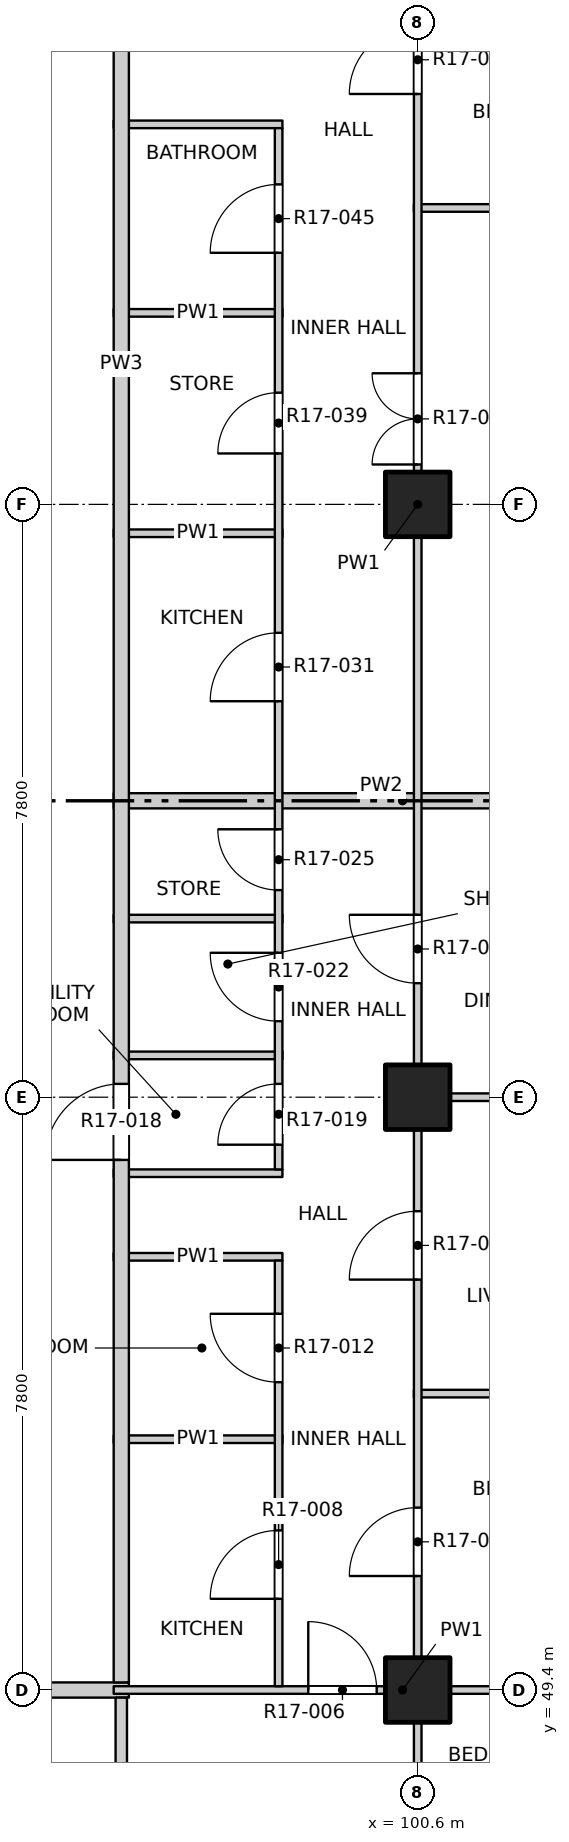
"""IFC4 building model, lengths in metres.
Left out: names, types, materials, properties, quantities, classifications, styles, units other than length and angle.
Written with IfcOpenShell. Run it as: python <this file> out.ifc"""

import sys

from ifc_helpers import new_model, si_unit, direction, frame, frame_2d, origin, origin_2d, place, context, subcontext, project, spatial, rectangle, extrude, element, fill, save


model = new_model("IFC4")
c1 = context("Model", 3, precision=1e-05, world=origin(), true_north=direction((0.0, 1.0)))
c2 = subcontext(c1, "Body", "Model", "MODEL_VIEW")
j1 = project(units=[si_unit("LENGTHUNIT", "METRE"), si_unit("PLANEANGLEUNIT", "RADIAN")], contexts=[c1])
p1 = place(None, origin())
s1 = spatial("IfcSite", under=j1, at=p1, CompositionType="ELEMENT")
p2 = place(p1, origin())
s2 = spatial("IfcBuilding", under=s1, at=p2, CompositionType="ELEMENT")
p3 = place(p2, frame((0.0, 0.0, 179.2)))
s3 = spatial("IfcBuildingStorey", under=s2, at=p3, CompositionType="ELEMENT", Elevation=179.2)
for number, where, z_axis, x_axis in (
    (1, (100.6, 49.4, -0.3), (0.0, 0.0, 1.0), (1.0, 0.0, 0.0)),
    (2, (100.6, 57.2, -0.3), (0.0, 0.0, 1.0), (1.0, 0.0, 0.0)),
    (3, (100.6, 65.0, -0.3), (0.0, 0.0, 1.0), (1.0, 0.0, 0.0)),
):
    element("IfcColumn", number, at=place(p3, frame(where, z_axis=z_axis, x_axis=x_axis)), inside=s3, PredefinedType="COLUMN", context=c2, shape_type="SweptSolid", body=[
        extrude(rectangle(XDim=0.85, YDim=0.85, at=origin_2d()), origin(), (0.0, 0.0, 1.0), 3.45),
    ])
p4 = place(p3, frame((73.2, 49.4, 0.0), z_axis=(0.0, 0.0, 1.0), x_axis=(1.0, 0.0, 0.0)))
e4 = element("IfcWall", 4, at=p4, inside=s3, PredefinedType="PARTITIONING", context=c2, shape_type="SweptSolid", body=[
    extrude(rectangle(XDim=23.6, YDim=0.2, at=frame_2d((11.8, 0.0))), origin(), (0.0, 0.0, 1.0), 3.15),
])
p5 = place(p4, frame((7.3, 0.0, 0.0)))
e5 = element("IfcOpeningElement", 5, at=p5, cuts=e4, PredefinedType="OPENING", context=c2, shape_type="SweptSolid", body=[
    extrude(rectangle(XDim=1.2, YDim=2.1, at=frame_2d((0.6, 1.05))), frame((0.0, 0.11, 0.0), z_axis=(0.0, -1.0, 0.0), x_axis=(1.0, 0.0, 0.0)), (0.0, 0.0, 1.0), 0.22),
])
p6 = place(p4, frame((20.125, 0.0, 0.0)))
e6 = element("IfcOpeningElement", 6, at=p6, cuts=e4, PredefinedType="OPENING", context=c2, shape_type="SweptSolid", body=[
    extrude(rectangle(XDim=1.2, YDim=2.1, at=frame_2d((0.6, 1.05))), frame((0.0, 0.11, 0.0), z_axis=(0.0, -1.0, 0.0), x_axis=(1.0, 0.0, 0.0)), (0.0, 0.0, 1.0), 0.22),
])
p7 = place(p3, frame((96.6, 49.4, 0.0), z_axis=(0.0, 0.0, 1.0), x_axis=(1.0, 0.0, 0.0)))
e7 = element("IfcWall", 7, at=p7, inside=s3, PredefinedType="PARTITIONING", context=c2, shape_type="SweptSolid", body=[
    extrude(rectangle(XDim=7.6, YDim=0.1, at=frame_2d((3.8, 0.0))), origin(), (0.0, 0.0, 1.0), 3.15),
])
p8 = place(p7, frame((2.56, 0.0, 0.0)))
e8 = element("IfcOpeningElement", 8, at=p8, cuts=e7, PredefinedType="OPENING", context=c2, shape_type="SweptSolid", body=[
    extrude(rectangle(XDim=0.9, YDim=2.1, at=frame_2d((0.45, 1.05))), frame((0.0, 0.06, 0.0), z_axis=(0.0, -1.0, 0.0), x_axis=(1.0, 0.0, 0.0)), (0.0, 0.0, 1.0), 0.12),
])
p9 = place(p3, frame((96.6, 52.7, 0.0), z_axis=(0.0, 0.0, 1.0), x_axis=(1.0, 0.0, 0.0)))
e9 = element("IfcWall", 9, at=p9, inside=s3, PredefinedType="PARTITIONING", context=c2, shape_type="SweptSolid", body=[
    extrude(rectangle(XDim=2.22, YDim=0.1, at=frame_2d((1.11, 0.0))), origin(), (0.0, 0.0, 1.0), 3.15),
])
p10 = place(p3, frame((100.55, 53.3, 0.0), z_axis=(0.0, 0.0, 1.0), x_axis=(1.0, 0.0, 0.0)))
e10 = element("IfcWall", 10, at=p10, inside=s3, PredefinedType="PARTITIONING", context=c2, shape_type="SweptSolid", body=[
    extrude(rectangle(XDim=3.65, YDim=0.1, at=frame_2d((1.825, 0.0))), origin(), (0.0, 0.0, 1.0), 3.15),
])
for number, where, z_axis, x_axis in (
    (11, (96.6, 55.1, 0.0), (0.0, 0.0, 1.0), (1.0, 0.0, 0.0)),
    (12, (96.6, 56.2, 0.0), (0.0, 0.0, 1.0), (1.0, 0.0, 0.0)),
):
    element("IfcWall", number, at=place(p3, frame(where, z_axis=z_axis, x_axis=x_axis)), inside=s3, PredefinedType="PARTITIONING", context=c2, shape_type="SweptSolid", body=[
        extrude(rectangle(XDim=2.22, YDim=0.1, at=frame_2d((1.11, 0.0))), origin(), (0.0, 0.0, 1.0), 3.15),
    ])
p11 = place(p3, frame((100.55, 57.2, 0.0), z_axis=(0.0, 0.0, 1.0), x_axis=(1.0, 0.0, 0.0)))
e13 = element("IfcWall", 13, at=p11, inside=s3, PredefinedType="PARTITIONING", context=c2, shape_type="SweptSolid", body=[
    extrude(rectangle(XDim=3.65, YDim=0.1, at=frame_2d((1.825, 0.0))), origin(), (0.0, 0.0, 1.0), 3.15),
])
for number, where, z_axis, x_axis in (
    (14, (96.6, 57.75, 0.0), (0.0, 0.0, 1.0), (1.0, 0.0, 0.0)),
    (15, (96.6, 59.55, 0.0), (0.0, 0.0, 1.0), (1.0, 0.0, 0.0)),
):
    element("IfcWall", number, at=place(p3, frame(where, z_axis=z_axis, x_axis=x_axis)), inside=s3, PredefinedType="PARTITIONING", context=c2, shape_type="SweptSolid", body=[
        extrude(rectangle(XDim=2.22, YDim=0.1, at=frame_2d((1.11, 0.0))), origin(), (0.0, 0.0, 1.0), 3.15),
    ])
p12 = place(p3, frame((96.6, 61.1, 0.0), z_axis=(0.0, 0.0, 1.0), x_axis=(1.0, 0.0, 0.0)))
e16 = element("IfcWall", 16, at=p12, inside=s3, PredefinedType="PARTITIONING", context=c2, shape_type="SweptSolid", body=[
    extrude(rectangle(XDim=7.6, YDim=0.2, at=frame_2d((3.8, 0.0))), origin(), (0.0, 0.0, 1.0), 2.55),
])
for number, where, z_axis, x_axis in (
    (17, (96.6, 64.62, 0.0), (0.0, 0.0, 1.0), (1.0, 0.0, 0.0)),
    (18, (96.6, 67.52, 0.0), (0.0, 0.0, 1.0), (1.0, 0.0, 0.0)),
):
    element("IfcWall", number, at=place(p3, frame(where, z_axis=z_axis, x_axis=x_axis)), inside=s3, PredefinedType="PARTITIONING", context=c2, shape_type="SweptSolid", body=[
        extrude(rectangle(XDim=2.22, YDim=0.1, at=frame_2d((1.11, 0.0))), origin(), (0.0, 0.0, 1.0), 3.15),
    ])
p13 = place(p3, frame((100.55, 68.9, 0.0), z_axis=(0.0, 0.0, 1.0), x_axis=(1.0, 0.0, 0.0)))
e19 = element("IfcWall", 19, at=p13, inside=s3, PredefinedType="PARTITIONING", context=c2, shape_type="SweptSolid", body=[
    extrude(rectangle(XDim=3.65, YDim=0.1, at=frame_2d((1.825, 0.0))), origin(), (0.0, 0.0, 1.0), 2.55),
])
p14 = place(p3, frame((96.6, 70.0, 0.0), z_axis=(0.0, 0.0, 1.0), x_axis=(1.0, 0.0, 0.0)))
e20 = element("IfcWall", 20, at=p14, inside=s3, PredefinedType="PARTITIONING", context=c2, shape_type="SweptSolid", body=[
    extrude(rectangle(XDim=2.22, YDim=0.1, at=frame_2d((1.11, 0.0))), origin(), (0.0, 0.0, 1.0), 3.15),
])
p15 = place(p3, frame((96.7, 45.8, 0.0), z_axis=(0.0, 0.0, 1.0), x_axis=(0.0, 1.0, 0.0)))
e21 = element("IfcWall", 21, at=p15, inside=s3, PredefinedType="PARTITIONING", context=c2, shape_type="SweptSolid", body=[
    extrude(rectangle(XDim=3.5, YDim=0.15, at=frame_2d((1.75, 0.0))), origin(), (0.0, 0.0, 1.0), 3.15),
])
p16 = place(p3, frame((96.7, 49.5, 0.0), z_axis=(0.0, 0.0, 1.0), x_axis=(0.0, 1.0, 0.0)))
e22 = element("IfcWall", 22, at=p16, inside=s3, PredefinedType="PARTITIONING", context=c2, shape_type="SweptSolid", body=[
    extrude(rectangle(XDim=34.7, YDim=0.2, at=frame_2d((17.35, 0.0))), origin(), (0.0, 0.0, 1.0), 3.15),
])
p17 = place(p16, frame((6.875, 0.0, 0.0)))
e23 = element("IfcOpeningElement", 23, at=p17, cuts=e22, PredefinedType="OPENING", context=c2, shape_type="SweptSolid", body=[
    extrude(rectangle(XDim=1.0, YDim=2.1, at=frame_2d((0.5, 1.05))), frame((0.0, 0.11, 0.0), z_axis=(0.0, -1.0, 0.0), x_axis=(1.0, 0.0, 0.0)), (0.0, 0.0, 1.0), 0.22),
])
p18 = place(p16, frame((21.775, 0.0, 0.0)))
e24 = element("IfcOpeningElement", 24, at=p18, cuts=e22, PredefinedType="OPENING", context=c2, shape_type="SweptSolid", body=[
    extrude(rectangle(XDim=1.0, YDim=2.1, at=frame_2d((0.5, 1.05))), frame((0.0, 0.11, 0.0), z_axis=(0.0, -1.0, 0.0), x_axis=(1.0, 0.0, 0.0)), (0.0, 0.0, 1.0), 0.22),
])
p19 = place(p16, frame((27.725, 0.0, 0.0)))
e25 = element("IfcOpeningElement", 25, at=p19, cuts=e22, PredefinedType="OPENING", context=c2, shape_type="SweptSolid", body=[
    extrude(rectangle(XDim=1.0, YDim=2.1, at=frame_2d((0.5, 1.05))), frame((0.0, 0.11, 0.0), z_axis=(0.0, -1.0, 0.0), x_axis=(1.0, 0.0, 0.0)), (0.0, 0.0, 1.0), 0.22),
])
p20 = place(p3, frame((98.77, 49.45, 0.0), z_axis=(0.0, 0.0, 1.0), x_axis=(0.0, 1.0, 0.0)))
e26 = element("IfcWall", 26, at=p20, inside=s3, PredefinedType="PARTITIONING", context=c2, shape_type="SweptSolid", body=[
    extrude(rectangle(XDim=5.6, YDim=0.1, at=frame_2d((2.8, 0.0))), origin(), (0.0, 0.0, 1.0), 3.15),
])
p21 = place(p20, frame((1.15, 0.0, 0.0)))
e27 = element("IfcOpeningElement", 27, at=p21, cuts=e26, PredefinedType="OPENING", context=c2, shape_type="SweptSolid", body=[
    extrude(rectangle(XDim=0.9, YDim=2.1, at=frame_2d((0.45, 1.05))), frame((0.0, 0.06, 0.0), z_axis=(0.0, -1.0, 0.0), x_axis=(1.0, 0.0, 0.0)), (0.0, 0.0, 1.0), 0.12),
])
p22 = place(p20, frame((4.0, 0.0, 0.0)))
e28 = element("IfcOpeningElement", 28, at=p22, cuts=e26, PredefinedType="OPENING", context=c2, shape_type="SweptSolid", body=[
    extrude(rectangle(XDim=0.9, YDim=2.1, at=frame_2d((0.45, 1.05))), frame((0.0, 0.06, 0.0), z_axis=(0.0, -1.0, 0.0), x_axis=(1.0, 0.0, 0.0)), (0.0, 0.0, 1.0), 0.12),
])
p23 = place(p3, frame((98.77, 56.25, 0.0), z_axis=(0.0, 0.0, 1.0), x_axis=(0.0, 1.0, 0.0)))
e29 = element("IfcWall", 29, at=p23, inside=s3, PredefinedType="PARTITIONING", context=c2, shape_type="SweptSolid", body=[
    extrude(rectangle(XDim=13.7, YDim=0.1, at=frame_2d((6.85, 0.0))), origin(), (0.0, 0.0, 1.0), 3.15),
])
p24 = place(p23, frame((0.325, 0.0, 0.0)))
e30 = element("IfcOpeningElement", 30, at=p24, cuts=e29, PredefinedType="OPENING", context=c2, shape_type="SweptSolid", body=[
    extrude(rectangle(XDim=0.8, YDim=2.1, at=frame_2d((0.4, 1.05))), frame((0.0, 0.06, 0.0), z_axis=(0.0, -1.0, 0.0), x_axis=(1.0, 0.0, 0.0)), (0.0, 0.0, 1.0), 0.12),
])
p25 = place(p23, frame((1.95, 0.0, 0.0)))
e31 = element("IfcOpeningElement", 31, at=p25, cuts=e29, PredefinedType="OPENING", context=c2, shape_type="SweptSolid", body=[
    extrude(rectangle(XDim=0.9, YDim=2.1, at=frame_2d((0.45, 1.05))), frame((0.0, 0.06, 0.0), z_axis=(0.0, -1.0, 0.0), x_axis=(1.0, 0.0, 0.0)), (0.0, 0.0, 1.0), 0.12),
])
p26 = place(p23, frame((3.675, 0.0, 0.0)))
e32 = element("IfcOpeningElement", 32, at=p26, cuts=e29, PredefinedType="OPENING", context=c2, shape_type="SweptSolid", body=[
    extrude(rectangle(XDim=0.8, YDim=2.1, at=frame_2d((0.4, 1.05))), frame((0.0, 0.06, 0.0), z_axis=(0.0, -1.0, 0.0), x_axis=(1.0, 0.0, 0.0)), (0.0, 0.0, 1.0), 0.12),
])
p27 = place(p23, frame((6.16, 0.0, 0.0)))
e33 = element("IfcOpeningElement", 33, at=p27, cuts=e29, PredefinedType="OPENING", context=c2, shape_type="SweptSolid", body=[
    extrude(rectangle(XDim=0.9, YDim=2.1, at=frame_2d((0.45, 1.05))), frame((0.0, 0.06, 0.0), z_axis=(0.0, -1.0, 0.0), x_axis=(1.0, 0.0, 0.0)), (0.0, 0.0, 1.0), 0.12),
])
p28 = place(p23, frame((9.42, 0.0, 0.0)))
e34 = element("IfcOpeningElement", 34, at=p28, cuts=e29, PredefinedType="OPENING", context=c2, shape_type="SweptSolid", body=[
    extrude(rectangle(XDim=0.8, YDim=2.1, at=frame_2d((0.4, 1.05))), frame((0.0, 0.06, 0.0), z_axis=(0.0, -1.0, 0.0), x_axis=(1.0, 0.0, 0.0)), (0.0, 0.0, 1.0), 0.12),
])
p29 = place(p23, frame((12.06, 0.0, 0.0)))
e35 = element("IfcOpeningElement", 35, at=p29, cuts=e29, PredefinedType="OPENING", context=c2, shape_type="SweptSolid", body=[
    extrude(rectangle(XDim=0.9, YDim=2.1, at=frame_2d((0.45, 1.05))), frame((0.0, 0.06, 0.0), z_axis=(0.0, -1.0, 0.0), x_axis=(1.0, 0.0, 0.0)), (0.0, 0.0, 1.0), 0.12),
])
p30 = place(p3, frame((100.6, 45.8, 0.0), z_axis=(0.0, 0.0, 1.0), x_axis=(0.0, 1.0, 0.0)))
e36 = element("IfcWall", 36, at=p30, inside=s3, PredefinedType="PARTITIONING", context=c2, shape_type="SweptSolid", body=[
    extrude(rectangle(XDim=38.4, YDim=0.1, at=frame_2d((19.2, 0.0))), origin(), (0.0, 0.0, 1.0), 3.15),
])
p31 = place(p30, frame((1.05, 0.0, 0.0)))
e37 = element("IfcOpeningElement", 37, at=p31, cuts=e36, PredefinedType="OPENING", context=c2, shape_type="SweptSolid", body=[
    extrude(rectangle(XDim=1.2, YDim=2.1, at=frame_2d((0.6, 1.05))), frame((0.0, 0.06, 0.0), z_axis=(0.0, -1.0, 0.0), x_axis=(1.0, 0.0, 0.0)), (0.0, 0.0, 1.0), 0.12),
])
p32 = place(p30, frame((5.1, 0.0, 0.0)))
e38 = element("IfcOpeningElement", 38, at=p32, cuts=e36, PredefinedType="OPENING", context=c2, shape_type="SweptSolid", body=[
    extrude(rectangle(XDim=0.9, YDim=2.1, at=frame_2d((0.45, 1.05))), frame((0.0, 0.06, 0.0), z_axis=(0.0, -1.0, 0.0), x_axis=(1.0, 0.0, 0.0)), (0.0, 0.0, 1.0), 0.12),
])
p33 = place(p30, frame((9.0, 0.0, 0.0)))
e39 = element("IfcOpeningElement", 39, at=p33, cuts=e36, PredefinedType="OPENING", context=c2, shape_type="SweptSolid", body=[
    extrude(rectangle(XDim=0.9, YDim=2.1, at=frame_2d((0.45, 1.05))), frame((0.0, 0.06, 0.0), z_axis=(0.0, -1.0, 0.0), x_axis=(1.0, 0.0, 0.0)), (0.0, 0.0, 1.0), 0.12),
])
p34 = place(p30, frame((12.9, 0.0, 0.0)))
e40 = element("IfcOpeningElement", 40, at=p34, cuts=e36, PredefinedType="OPENING", context=c2, shape_type="SweptSolid", body=[
    extrude(rectangle(XDim=0.9, YDim=2.1, at=frame_2d((0.45, 1.05))), frame((0.0, 0.06, 0.0), z_axis=(0.0, -1.0, 0.0), x_axis=(1.0, 0.0, 0.0)), (0.0, 0.0, 1.0), 0.12),
])
p35 = place(p30, frame((19.725, 0.0, 0.0)))
e41 = element("IfcOpeningElement", 41, at=p35, cuts=e36, PredefinedType="OPENING", context=c2, shape_type="SweptSolid", body=[
    extrude(rectangle(XDim=1.2, YDim=2.1, at=frame_2d((0.6, 1.05))), frame((0.0, 0.06, 0.0), z_axis=(0.0, -1.0, 0.0), x_axis=(1.0, 0.0, 0.0)), (0.0, 0.0, 1.0), 0.12),
])
p36 = place(p30, frame((24.6, 0.0, 0.0)))
e42 = element("IfcOpeningElement", 42, at=p36, cuts=e36, PredefinedType="OPENING", context=c2, shape_type="SweptSolid", body=[
    extrude(rectangle(XDim=0.9, YDim=2.1, at=frame_2d((0.45, 1.05))), frame((0.0, 0.06, 0.0), z_axis=(0.0, -1.0, 0.0), x_axis=(1.0, 0.0, 0.0)), (0.0, 0.0, 1.0), 0.12),
])
p37 = place(p30, frame((28.5, 0.0, 0.0)))
e43 = element("IfcOpeningElement", 43, at=p37, cuts=e36, PredefinedType="OPENING", context=c2, shape_type="SweptSolid", body=[
    extrude(rectangle(XDim=0.9, YDim=2.1, at=frame_2d((0.45, 1.05))), frame((0.0, 0.06, 0.0), z_axis=(0.0, -1.0, 0.0), x_axis=(1.0, 0.0, 0.0)), (0.0, 0.0, 1.0), 0.12),
])
p38 = place(p30, frame((32.4, 0.0, 0.0)))
e44 = element("IfcOpeningElement", 44, at=p38, cuts=e36, PredefinedType="OPENING", context=c2, shape_type="SweptSolid", body=[
    extrude(rectangle(XDim=0.9, YDim=2.1, at=frame_2d((0.45, 1.05))), frame((0.0, 0.06, 0.0), z_axis=(0.0, -1.0, 0.0), x_axis=(1.0, 0.0, 0.0)), (0.0, 0.0, 1.0), 0.12),
])
p39 = place(p30, frame((36.15, 0.0, 0.0)))
e45 = element("IfcOpeningElement", 45, at=p39, cuts=e36, PredefinedType="OPENING", context=c2, shape_type="SweptSolid", body=[
    extrude(rectangle(XDim=1.2, YDim=2.1, at=frame_2d((0.6, 1.05))), frame((0.0, 0.06, 0.0), z_axis=(0.0, -1.0, 0.0), x_axis=(1.0, 0.0, 0.0)), (0.0, 0.0, 1.0), 0.12),
])
p40 = place(p8, origin())
e46 = element("IfcDoor", 46, at=p40, inside=s3, OperationType="SINGLE_SWING_LEFT", PredefinedType="DOOR", context=c2, shape_type="SweptSolid", body=[
    extrude(rectangle(XDim=0.9, YDim=2.1, at=frame_2d((0.45, 1.05))), frame((0.0, 0.025, 0.0), z_axis=(0.0, -1.0, 0.0), x_axis=(1.0, 0.0, 0.0)), (0.0, 0.0, 1.0), 0.05),
])
fill(e8, e46)
p41 = place(p21, origin())
e47 = element("IfcDoor", 47, at=p41, inside=s3, OperationType="SINGLE_SWING_LEFT", PredefinedType="DOOR", context=c2, shape_type="SweptSolid", body=[
    extrude(rectangle(XDim=0.9, YDim=2.1, at=frame_2d((0.45, 1.05))), frame((0.0, 0.025, 0.0), z_axis=(0.0, -1.0, 0.0), x_axis=(1.0, 0.0, 0.0)), (0.0, 0.0, 1.0), 0.05),
])
fill(e27, e47)
p42 = place(p32, origin())
e48 = element("IfcDoor", 48, at=p42, inside=s3, OperationType="SINGLE_SWING_LEFT", PredefinedType="DOOR", context=c2, shape_type="SweptSolid", body=[
    extrude(rectangle(XDim=0.9, YDim=2.1, at=frame_2d((0.45, 1.05))), frame((0.0, 0.025, 0.0), z_axis=(0.0, -1.0, 0.0), x_axis=(1.0, 0.0, 0.0)), (0.0, 0.0, 1.0), 0.05),
])
fill(e38, e48)
p43 = place(p22, origin())
e49 = element("IfcDoor", 49, at=p43, inside=s3, OperationType="SINGLE_SWING_RIGHT", PredefinedType="DOOR", context=c2, shape_type="SweptSolid", body=[
    extrude(rectangle(XDim=0.9, YDim=2.1, at=frame_2d((0.45, 1.05))), frame((0.0, 0.025, 0.0), z_axis=(0.0, -1.0, 0.0), x_axis=(1.0, 0.0, 0.0)), (0.0, 0.0, 1.0), 0.05),
])
fill(e28, e49)
p44 = place(p33, origin())
e50 = element("IfcDoor", 50, at=p44, inside=s3, OperationType="SINGLE_SWING_LEFT", PredefinedType="DOOR", context=c2, shape_type="SweptSolid", body=[
    extrude(rectangle(XDim=0.9, YDim=2.1, at=frame_2d((0.45, 1.05))), frame((0.0, 0.025, 0.0), z_axis=(0.0, -1.0, 0.0), x_axis=(1.0, 0.0, 0.0)), (0.0, 0.0, 1.0), 0.05),
])
fill(e39, e50)
p45 = place(p17, origin())
e51 = element("IfcDoor", 51, at=p45, inside=s3, OperationType="SINGLE_SWING_LEFT", PredefinedType="DOOR", context=c2, shape_type="SweptSolid", body=[
    extrude(rectangle(XDim=1.0, YDim=2.1, at=frame_2d((0.5, 1.05))), frame((0.0, 0.025, 0.0), z_axis=(0.0, -1.0, 0.0), x_axis=(1.0, 0.0, 0.0)), (0.0, 0.0, 1.0), 0.05),
])
fill(e23, e51)
p46 = place(p24, origin())
e52 = element("IfcDoor", 52, at=p46, inside=s3, OperationType="SINGLE_SWING_LEFT", PredefinedType="DOOR", context=c2, shape_type="SweptSolid", body=[
    extrude(rectangle(XDim=0.8, YDim=2.1, at=frame_2d((0.4, 1.05))), frame((0.0, 0.025, 0.0), z_axis=(0.0, -1.0, 0.0), x_axis=(1.0, 0.0, 0.0)), (0.0, 0.0, 1.0), 0.05),
])
fill(e30, e52)
p47 = place(p25, origin())
e53 = element("IfcDoor", 53, at=p47, inside=s3, OperationType="SINGLE_SWING_RIGHT", PredefinedType="DOOR", context=c2, shape_type="SweptSolid", body=[
    extrude(rectangle(XDim=0.9, YDim=2.1, at=frame_2d((0.45, 1.05))), frame((0.0, 0.025, 0.0), z_axis=(0.0, -1.0, 0.0), x_axis=(1.0, 0.0, 0.0)), (0.0, 0.0, 1.0), 0.05),
])
fill(e31, e53)
p48 = place(p34, origin())
e54 = element("IfcDoor", 54, at=p48, inside=s3, OperationType="SINGLE_SWING_RIGHT", PredefinedType="DOOR", context=c2, shape_type="SweptSolid", body=[
    extrude(rectangle(XDim=0.9, YDim=2.1, at=frame_2d((0.45, 1.05))), frame((0.0, 0.025, 0.0), z_axis=(0.0, -1.0, 0.0), x_axis=(1.0, 0.0, 0.0)), (0.0, 0.0, 1.0), 0.05),
])
fill(e40, e54)
p49 = place(p26, origin())
e55 = element("IfcDoor", 55, at=p49, inside=s3, OperationType="SINGLE_SWING_RIGHT", PredefinedType="DOOR", context=c2, shape_type="SweptSolid", body=[
    extrude(rectangle(XDim=0.8, YDim=2.1, at=frame_2d((0.4, 1.05))), frame((0.0, 0.025, 0.0), z_axis=(0.0, -1.0, 0.0), x_axis=(1.0, 0.0, 0.0)), (0.0, 0.0, 1.0), 0.05),
])
fill(e32, e55)
p50 = place(p27, origin())
e56 = element("IfcDoor", 56, at=p50, inside=s3, OperationType="SINGLE_SWING_LEFT", PredefinedType="DOOR", context=c2, shape_type="SweptSolid", body=[
    extrude(rectangle(XDim=0.9, YDim=2.1, at=frame_2d((0.45, 1.05))), frame((0.0, 0.025, 0.0), z_axis=(0.0, -1.0, 0.0), x_axis=(1.0, 0.0, 0.0)), (0.0, 0.0, 1.0), 0.05),
])
fill(e33, e56)
p51 = place(p28, origin())
e57 = element("IfcDoor", 57, at=p51, inside=s3, OperationType="SINGLE_SWING_LEFT", PredefinedType="DOOR", context=c2, shape_type="SweptSolid", body=[
    extrude(rectangle(XDim=0.8, YDim=2.1, at=frame_2d((0.4, 1.05))), frame((0.0, 0.025, 0.0), z_axis=(0.0, -1.0, 0.0), x_axis=(1.0, 0.0, 0.0)), (0.0, 0.0, 1.0), 0.05),
])
fill(e34, e57)
p52 = place(p35, origin())
e58 = element("IfcDoor", 58, at=p52, inside=s3, OperationType="DOUBLE_DOOR_SINGLE_SWING", PredefinedType="DOOR", context=c2, shape_type="SweptSolid", body=[
    extrude(rectangle(XDim=1.2, YDim=2.1, at=frame_2d((0.6, 1.05))), frame((0.0, 0.025, 0.0), z_axis=(0.0, -1.0, 0.0), x_axis=(1.0, 0.0, 0.0)), (0.0, 0.0, 1.0), 0.05),
])
fill(e41, e58)
p53 = place(p29, origin())
e59 = element("IfcDoor", 59, at=p53, inside=s3, OperationType="SINGLE_SWING_LEFT", PredefinedType="DOOR", context=c2, shape_type="SweptSolid", body=[
    extrude(rectangle(XDim=0.9, YDim=2.1, at=frame_2d((0.45, 1.05))), frame((0.0, 0.025, 0.0), z_axis=(0.0, -1.0, 0.0), x_axis=(1.0, 0.0, 0.0)), (0.0, 0.0, 1.0), 0.05),
])
fill(e35, e59)
p54 = place(p36, origin())
e60 = element("IfcDoor", 60, at=p54, inside=s3, OperationType="SINGLE_SWING_LEFT", PredefinedType="DOOR", context=c2, shape_type="SweptSolid", body=[
    extrude(rectangle(XDim=0.9, YDim=2.1, at=frame_2d((0.45, 1.05))), frame((0.0, 0.025, 0.0), z_axis=(0.0, -1.0, 0.0), x_axis=(1.0, 0.0, 0.0)), (0.0, 0.0, 1.0), 0.05),
])
fill(e42, e60)
save(model, sys.argv[1])
